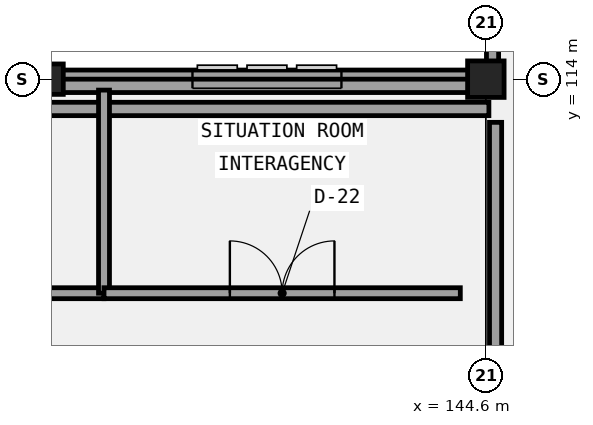
"""IFC4 building model, lengths in metres.
Left out: names, types, materials, properties, quantities, classifications, styles, units other than length and angle.
Written with IfcOpenShell. Run it as: python <this file> out.ifc"""

import sys

from ifc_helpers import new_model, si_unit, direction, frame, frame_2d, origin, origin_2d, place, context, subcontext, project, spatial, rectangle, extrude, element, fill, save


model = new_model("IFC4")
c1 = context("Model", 3, precision=1e-05, world=origin(), true_north=direction((0.0, 1.0)))
c2 = subcontext(c1, "Body", "Model", "MODEL_VIEW")
j1 = project(units=[si_unit("LENGTHUNIT", "METRE"), si_unit("PLANEANGLEUNIT", "RADIAN")], contexts=[c1])
p1 = place(None, origin())
s1 = spatial("IfcSite", under=j1, at=p1, CompositionType="ELEMENT")
p2 = place(p1, origin())
s2 = spatial("IfcBuilding", under=s1, at=p2, CompositionType="ELEMENT")
p3 = place(p2, frame((0.0, 0.0, 30.9)))
s3 = spatial("IfcBuildingStorey", under=s2, at=p3, CompositionType="ELEMENT", Elevation=30.9)
p4 = place(p3, frame((137.4, 114.0, 0.0), z_axis=(0.0, 0.0, 1.0), x_axis=(1.0, 0.0, 0.0)))
e1 = element("IfcColumn", 1, at=p4, inside=s3, PredefinedType="COLUMN", context=c2, shape_type="SweptSolid", body=[
    extrude(rectangle(XDim=0.5, YDim=0.5, at=origin_2d()), origin(), (0.0, 0.0, 1.0), 4.5),
])
p5 = place(p3, frame((144.6, 114.0, 0.0), z_axis=(0.0, 0.0, 1.0), x_axis=(1.0, 0.0, 0.0)))
e2 = element("IfcColumn", 2, at=p5, inside=s3, PredefinedType="COLUMN", context=c2, shape_type="SweptSolid", body=[
    extrude(rectangle(XDim=0.6, YDim=0.6, at=origin_2d()), origin(), (0.0, 0.0, 1.0), 4.5),
])
p6 = place(p3, frame((144.75, 114.0, 0.0), z_axis=(0.0, 0.0, 1.0), x_axis=(-1.0, 0.0, 0.0)))
e3 = element("IfcWall", 3, at=p6, inside=s3, PredefinedType="SOLIDWALL", context=c2, shape_type="SweptSolid", body=[
    extrude(rectangle(XDim=36.3, YDim=0.3, at=frame_2d((18.15, 0.0))), origin(), (0.0, 0.0, 1.0), 3.5),
])
p7 = place(p6, frame((31.45, 0.0, 0.95)))
e4 = element("IfcOpeningElement", 4, at=p7, cuts=e3, PredefinedType="OPENING", context=c2, shape_type="SweptSolid", body=[
    extrude(rectangle(XDim=2.2, YDim=2.15, at=frame_2d((1.1, 1.075))), frame((0.0, 0.16, 0.0), z_axis=(0.0, -1.0, 0.0), x_axis=(1.0, 0.0, 0.0)), (0.0, 0.0, 1.0), 0.32),
])
p8 = place(p6, frame((24.125, 0.0, 0.95)))
e5 = element("IfcOpeningElement", 5, at=p8, cuts=e3, PredefinedType="OPENING", context=c2, shape_type="SweptSolid", body=[
    extrude(rectangle(XDim=2.45, YDim=1.4, at=frame_2d((1.225, 0.7))), frame((0.0, 0.16, 0.0), z_axis=(0.0, -1.0, 0.0), x_axis=(1.0, 0.0, 0.0)), (0.0, 0.0, 1.0), 0.32),
])
p9 = place(p6, frame((16.925, 0.0, 0.95)))
e6 = element("IfcOpeningElement", 6, at=p9, cuts=e3, PredefinedType="OPENING", context=c2, shape_type="SweptSolid", body=[
    extrude(rectangle(XDim=2.45, YDim=1.65, at=frame_2d((1.225, 0.825))), frame((0.0, 0.16, 0.0), z_axis=(0.0, -1.0, 0.0), x_axis=(1.0, 0.0, 0.0)), (0.0, 0.0, 1.0), 0.32),
])
p10 = place(p6, frame((9.725, 0.0, 0.95)))
e7 = element("IfcOpeningElement", 7, at=p10, cuts=e3, PredefinedType="OPENING", context=c2, shape_type="SweptSolid", body=[
    extrude(rectangle(XDim=2.45, YDim=1.9, at=frame_2d((1.225, 0.95))), frame((0.0, 0.16, 0.0), z_axis=(0.0, -1.0, 0.0), x_axis=(1.0, 0.0, 0.0)), (0.0, 0.0, 1.0), 0.32),
])
p11 = place(p6, frame((2.525, 0.0, 0.95)))
e8 = element("IfcOpeningElement", 8, at=p11, cuts=e3, PredefinedType="OPENING", context=c2, shape_type="SweptSolid", body=[
    extrude(rectangle(XDim=2.45, YDim=2.15, at=frame_2d((1.225, 1.075))), frame((0.0, 0.16, 0.0), z_axis=(0.0, -1.0, 0.0), x_axis=(1.0, 0.0, 0.0)), (0.0, 0.0, 1.0), 0.32),
])
p12 = place(p3, frame((144.76, 79.31, 4.5), z_axis=(0.0, 0.0, 1.0), x_axis=(0.0, 1.0, 0.0)))
e9 = element("IfcWall", 9, at=p12, inside=s3, PredefinedType="PARAPET", context=c2, shape_type="SweptSolid", body=[
    extrude(rectangle(XDim=33.98, YDim=0.2, at=frame_2d((16.99, 0.0))), origin(), (0.0, 0.0, 1.0), 1.12),
])
p13 = place(p3, frame((144.65, 113.51, 4.5), z_axis=(0.0, 0.0, 1.0), x_axis=(-1.0, 0.0, 0.0)))
e10 = element("IfcWall", 10, at=p13, inside=s3, PredefinedType="PARAPET", context=c2, shape_type="SweptSolid", body=[
    extrude(rectangle(XDim=35.94, YDim=0.22, at=frame_2d((17.97, 0.0))), origin(), (0.0, 0.0, 1.0), 1.12),
])
p14 = place(p3, frame((108.71, 113.89, 4.5), z_axis=(0.0, 0.0, 1.0), x_axis=(1.0, 0.0, 0.0)))
e11 = element("IfcWall", 11, at=p14, inside=s3, PredefinedType="PARAPET", context=c2, shape_type="SweptSolid", body=[
    extrude(rectangle(XDim=35.89, YDim=0.22, at=frame_2d((17.945, 0.0))), origin(), (0.0, 0.0, 1.0), 1.12),
])
p15 = place(p3, frame((144.71, 114.11, 4.5), z_axis=(0.0, 0.0, 1.0), x_axis=(0.0, 1.0, 0.0)))
e12 = element("IfcWall", 12, at=p15, inside=s3, PredefinedType="PARAPET", context=c2, shape_type="SweptSolid", body=[
    extrude(rectangle(XDim=1.47, YDim=0.2, at=frame_2d((0.735, 0.0))), origin(), (0.0, 0.0, 1.0), 1.12),
])
p16 = place(p3, frame((131.61, 110.48, 0.0), z_axis=(0.0, 0.0, 1.0), x_axis=(1.0, 0.0, 0.0)))
e13 = element("IfcWall", 13, at=p16, inside=s3, PredefinedType="PARTITIONING", context=c2, shape_type="SweptSolid", body=[
    extrude(rectangle(XDim=6.71, YDim=0.18, at=frame_2d((3.355, 0.0))), origin(), (0.0, 0.0, 1.0), 3.7),
])
p17 = place(p16, frame((2.595, 0.0, 0.0)))
e14 = element("IfcOpeningElement", 14, at=p17, cuts=e13, PredefinedType="OPENING", context=c2, shape_type="SweptSolid", body=[
    extrude(rectangle(XDim=1.52, YDim=2.35, at=frame_2d((0.76, 1.175))), frame((0.0, 0.1, 0.0), z_axis=(0.0, -1.0, 0.0), x_axis=(1.0, 0.0, 0.0)), (0.0, 0.0, 1.0), 0.2),
])
p18 = place(p3, frame((138.32, 110.48, 0.0), z_axis=(0.0, 0.0, 1.0), x_axis=(0.0, 1.0, 0.0)))
e15 = element("IfcWall", 15, at=p18, inside=s3, PredefinedType="PARTITIONING", context=c2, shape_type="SweptSolid", body=[
    extrude(rectangle(XDim=3.34, YDim=0.18, at=frame_2d((1.67, 0.0))), origin(), (0.0, 0.0, 1.0), 4.25),
])
p19 = place(p3, frame((138.32, 110.48, 0.0), z_axis=(0.0, 0.0, 1.0), x_axis=(1.0, 0.0, 0.0)))
e16 = element("IfcWall", 16, at=p19, inside=s3, PredefinedType="PARTITIONING", context=c2, shape_type="SweptSolid", body=[
    extrude(rectangle(XDim=5.86, YDim=0.18, at=frame_2d((2.93, 0.0))), origin(), (0.0, 0.0, 1.0), 3.7),
])
p20 = place(p19, frame((2.07, 0.0, 0.0)))
e17 = element("IfcOpeningElement", 17, at=p20, cuts=e16, PredefinedType="OPENING", context=c2, shape_type="SweptSolid", body=[
    extrude(rectangle(XDim=1.72, YDim=2.1, at=frame_2d((0.86, 1.05))), frame((0.0, 0.1, 0.0), z_axis=(0.0, -1.0, 0.0), x_axis=(1.0, 0.0, 0.0)), (0.0, 0.0, 1.0), 0.2),
])
p21 = place(p11, origin())
e18 = element("IfcWindow", 18, at=p21, inside=s3, PartitioningType="SINGLE_PANEL", PredefinedType="WINDOW", context=c2, shape_type="SweptSolid", body=[
    extrude(rectangle(XDim=2.45, YDim=2.15, at=frame_2d((1.225, 1.075))), frame((0.0, 0.03, 0.0), z_axis=(0.0, -1.0, 0.0), x_axis=(1.0, 0.0, 0.0)), (0.0, 0.0, 1.0), 0.06),
])
fill(e8, e18)
p22 = place(p20, origin())
e19 = element("IfcDoor", 19, at=p22, inside=s3, OperationType="DOUBLE_DOOR_SINGLE_SWING", PredefinedType="DOOR", context=c2, shape_type="SweptSolid", body=[
    extrude(rectangle(XDim=1.72, YDim=2.1, at=frame_2d((0.86, 1.05))), frame((0.0, 0.025, 0.0), z_axis=(0.0, -1.0, 0.0), x_axis=(1.0, 0.0, 0.0)), (0.0, 0.0, 1.0), 0.05),
])
fill(e17, e19)
save(model, sys.argv[1])
